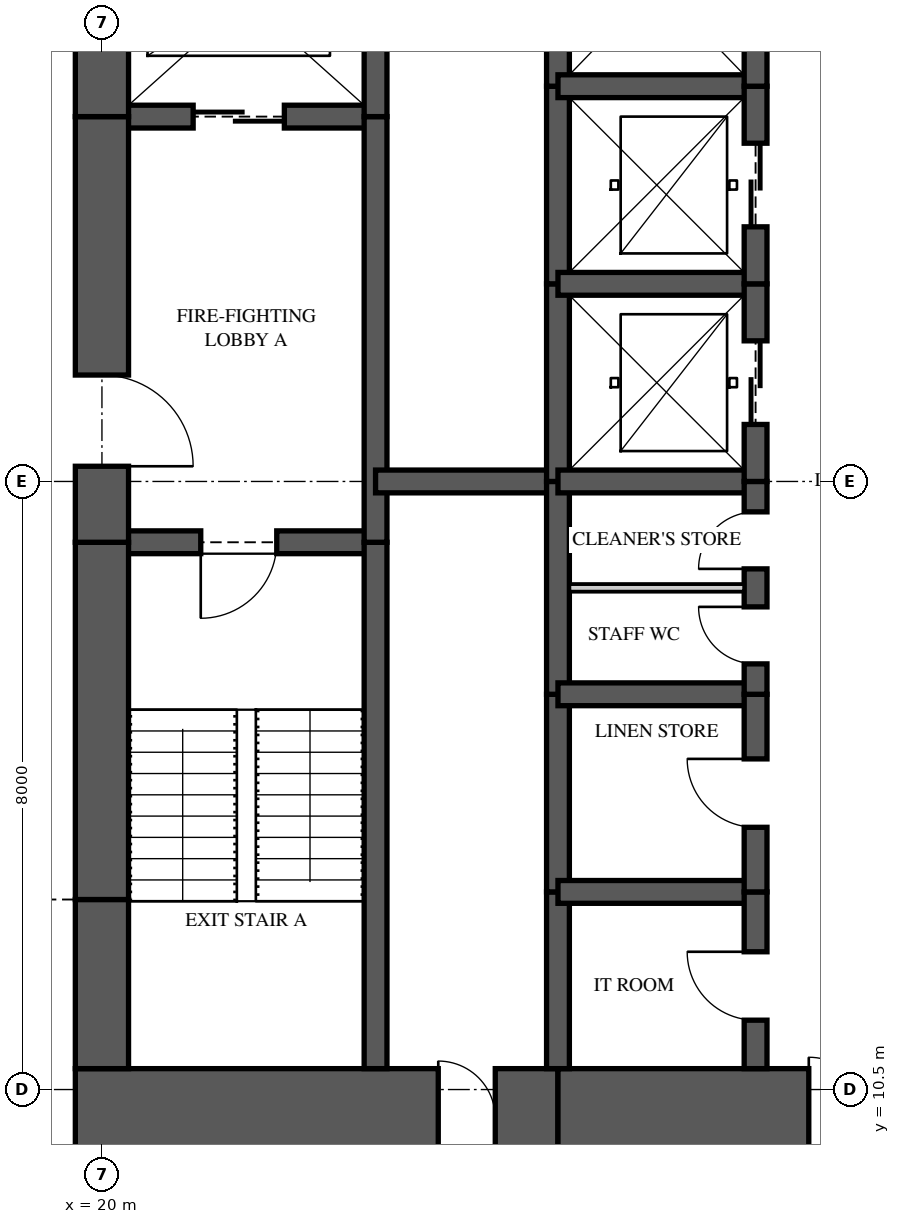
"""IFC4 building model, lengths in metres.
Left out: names, types, materials, properties, quantities, classifications, styles, units other than length and angle.
Written with IfcOpenShell. Run it as: python <this file> out.ifc"""

import sys

from ifc_helpers import new_model, si_unit, direction, frame, frame_2d, origin, place, context, subcontext, project, spatial, rectangle, extrude, element, fill, save


model = new_model("IFC4")
c1 = context("Model", 3, precision=1e-05, world=origin(), true_north=direction((0.0, 1.0)))
c2 = subcontext(c1, "Body", "Model", "MODEL_VIEW")
j1 = project(units=[si_unit("LENGTHUNIT", "METRE"), si_unit("PLANEANGLEUNIT", "RADIAN")], contexts=[c1])
p1 = place(None, origin())
s1 = spatial("IfcSite", under=j1, at=p1, CompositionType="ELEMENT")
p2 = place(p1, origin())
s2 = spatial("IfcBuilding", under=s1, at=p2, CompositionType="ELEMENT")
p3 = place(p2, frame((0.0, 0.0, 184.5)))
s3 = spatial("IfcBuildingStorey", under=s2, at=p3, CompositionType="ELEMENT", Elevation=184.5)
p4 = place(p3, frame((19.65, 10.125, 0.0), z_axis=(0.0, 0.0, 1.0), x_axis=(1.0, 0.0, 0.0)))
e1 = element("IfcWall", 1, at=p4, inside=s3, PredefinedType="SHEAR", context=c2, shape_type="SweptSolid", body=[
    extrude(rectangle(XDim=6.35, YDim=1.3, at=frame_2d((3.175, 0.0))), origin(), (0.0, 0.0, 1.0), 3.35),
])
p5 = place(p4, frame((4.775, 0.0, 0.0)))
e2 = element("IfcOpeningElement", 2, at=p5, cuts=e1, PredefinedType="OPENING", context=c2, shape_type="SweptSolid", body=[
    extrude(rectangle(XDim=0.75, YDim=2.1, at=frame_2d((0.375, 1.05))), frame((0.0, 0.66, 0.0), z_axis=(0.0, -1.0, 0.0), x_axis=(1.0, 0.0, 0.0)), (0.0, 0.0, 1.0), 1.32),
])
p6 = place(p3, frame((26.0, 10.125, 0.0), z_axis=(0.0, 0.0, 1.0), x_axis=(1.0, 0.0, 0.0)))
e3 = element("IfcWall", 3, at=p6, inside=s3, PredefinedType="SHEAR", context=c2, shape_type="SweptSolid", body=[
    extrude(rectangle(XDim=5.6, YDim=1.3, at=frame_2d((2.8, 0.0))), origin(), (0.0, 0.0, 1.0), 3.35),
])
p7 = place(p6, frame((3.3, 0.0, 0.0)))
e4 = element("IfcOpeningElement", 4, at=p7, cuts=e3, PredefinedType="OPENING", context=c2, shape_type="SweptSolid", body=[
    extrude(rectangle(XDim=1.6, YDim=2.1, at=frame_2d((0.8, 1.05))), frame((0.0, 0.66, 0.0), z_axis=(0.0, -1.0, 0.0), x_axis=(1.0, 0.0, 0.0)), (0.0, 0.0, 1.0), 1.32),
])
p8 = place(p3, frame((20.0, 26.225, 0.0), z_axis=(0.0, 0.0, 1.0), x_axis=(0.0, -1.0, 0.0)))
e5 = element("IfcWall", 5, at=p8, inside=s3, PredefinedType="SHEAR", context=c2, shape_type="SweptSolid", body=[
    extrude(rectangle(XDim=2.925, YDim=0.7, at=frame_2d((1.462, 0.0))), origin(), (0.0, 0.0, 1.0), 3.35),
])
p9 = place(p3, frame((20.0, 23.3, 0.0), z_axis=(0.0, 0.0, 1.0), x_axis=(0.0, -1.0, 0.0)))
e6 = element("IfcWall", 6, at=p9, inside=s3, PredefinedType="SHEAR", context=c2, shape_type="SweptSolid", body=[
    extrude(rectangle(XDim=5.6, YDim=0.7, at=frame_2d((2.8, 0.0))), origin(), (0.0, 0.0, 1.0), 3.35),
])
p10 = place(p9, frame((3.4, 0.0, 0.0)))
e7 = element("IfcOpeningElement", 7, at=p10, cuts=e6, PredefinedType="OPENING", context=c2, shape_type="SweptSolid", body=[
    extrude(rectangle(XDim=1.2, YDim=2.2, at=frame_2d((0.6, 1.1))), frame((0.0, 0.36, 0.0), z_axis=(0.0, -1.0, 0.0), x_axis=(1.0, 0.0, 0.0)), (0.0, 0.0, 1.0), 0.72),
])
p11 = place(p3, frame((20.0, 17.7, 0.0), z_axis=(0.0, 0.0, 1.0), x_axis=(0.0, -1.0, 0.0)))
e8 = element("IfcWall", 8, at=p11, inside=s3, PredefinedType="SHEAR", context=c2, shape_type="SweptSolid", body=[
    extrude(rectangle(XDim=4.7, YDim=0.7, at=frame_2d((2.35, 0.0))), origin(), (0.0, 0.0, 1.0), 3.35),
])
p12 = place(p3, frame((20.0, 13.0, 0.0), z_axis=(0.0, 0.0, 1.0), x_axis=(0.0, -1.0, 0.0)))
e9 = element("IfcWall", 9, at=p12, inside=s3, PredefinedType="SHEAR", context=c2, shape_type="SweptSolid", body=[
    extrude(rectangle(XDim=2.225, YDim=0.7, at=frame_2d((1.113, 0.0))), origin(), (0.0, 0.0, 1.0), 3.35),
])
p13 = place(p3, frame((23.6, 10.775, 0.0), z_axis=(0.0, 0.0, 1.0), x_axis=(0.0, 1.0, 0.0)))
e10 = element("IfcWall", 10, at=p13, inside=s3, PredefinedType="SHEAR", context=c2, shape_type="SweptSolid", body=[
    extrude(rectangle(XDim=6.925, YDim=0.3, at=frame_2d((3.462, 0.0))), origin(), (0.0, 0.0, 1.0), 3.35),
])
p14 = place(p3, frame((23.6, 17.7, 0.0), z_axis=(0.0, 0.0, 1.0), x_axis=(0.0, 1.0, 0.0)))
e11 = element("IfcWall", 11, at=p14, inside=s3, PredefinedType="SHEAR", context=c2, shape_type="SweptSolid", body=[
    extrude(rectangle(XDim=5.6, YDim=0.3, at=frame_2d((2.8, 0.0))), origin(), (0.0, 0.0, 1.0), 3.35),
])
p15 = place(p3, frame((23.6, 23.3, 0.0), z_axis=(0.0, 0.0, 1.0), x_axis=(0.0, 1.0, 0.0)))
e12 = element("IfcWall", 12, at=p15, inside=s3, PredefinedType="SHEAR", context=c2, shape_type="SweptSolid", body=[
    extrude(rectangle(XDim=2.925, YDim=0.3, at=frame_2d((1.462, 0.0))), origin(), (0.0, 0.0, 1.0), 3.35),
])
p16 = place(p3, frame((26.0, 10.775, 0.0), z_axis=(0.0, 0.0, 1.0), x_axis=(0.0, 1.0, 0.0)))
e13 = element("IfcWall", 13, at=p16, inside=s3, PredefinedType="SHEAR", context=c2, shape_type="SweptSolid", body=[
    extrude(rectangle(XDim=2.325, YDim=0.3, at=frame_2d((1.163, 0.0))), origin(), (0.0, 0.0, 1.0), 3.35),
])
p17 = place(p3, frame((26.0, 13.1, 0.0), z_axis=(0.0, 0.0, 1.0), x_axis=(0.0, 1.0, 0.0)))
e14 = element("IfcWall", 14, at=p17, inside=s3, PredefinedType="SHEAR", context=c2, shape_type="SweptSolid", body=[
    extrude(rectangle(XDim=2.6, YDim=0.3, at=frame_2d((1.3, 0.0))), origin(), (0.0, 0.0, 1.0), 3.35),
])
p18 = place(p3, frame((26.0, 15.7, 0.0), z_axis=(0.0, 0.0, 1.0), x_axis=(0.0, 1.0, 0.0)))
e15 = element("IfcWall", 15, at=p18, inside=s3, PredefinedType="SHEAR", context=c2, shape_type="SweptSolid", body=[
    extrude(rectangle(XDim=2.8, YDim=0.3, at=frame_2d((1.4, 0.0))), origin(), (0.0, 0.0, 1.0), 3.35),
])
p19 = place(p3, frame((26.0, 18.5, 0.0), z_axis=(0.0, 0.0, 1.0), x_axis=(0.0, 1.0, 0.0)))
e16 = element("IfcWall", 16, at=p19, inside=s3, PredefinedType="SHEAR", context=c2, shape_type="SweptSolid", body=[
    extrude(rectangle(XDim=2.6, YDim=0.3, at=frame_2d((1.3, 0.0))), origin(), (0.0, 0.0, 1.0), 3.35),
])
p20 = place(p3, frame((26.0, 21.1, 0.0), z_axis=(0.0, 0.0, 1.0), x_axis=(0.0, 1.0, 0.0)))
e17 = element("IfcWall", 17, at=p20, inside=s3, PredefinedType="SHEAR", context=c2, shape_type="SweptSolid", body=[
    extrude(rectangle(XDim=2.6, YDim=0.3, at=frame_2d((1.3, 0.0))), origin(), (0.0, 0.0, 1.0), 3.35),
])
p21 = place(p3, frame((26.0, 23.7, 0.0), z_axis=(0.0, 0.0, 1.0), x_axis=(0.0, 1.0, 0.0)))
e18 = element("IfcWall", 18, at=p21, inside=s3, PredefinedType="SHEAR", context=c2, shape_type="SweptSolid", body=[
    extrude(rectangle(XDim=2.525, YDim=0.3, at=frame_2d((1.263, 0.0))), origin(), (0.0, 0.0, 1.0), 3.35),
])
p22 = place(p3, frame((28.6, 10.775, 0.0), z_axis=(0.0, 0.0, 1.0), x_axis=(0.0, 1.0, 0.0)))
e19 = element("IfcWall", 19, at=p22, inside=s3, PredefinedType="SHEAR", context=c2, shape_type="SweptSolid", body=[
    extrude(rectangle(XDim=2.325, YDim=0.3, at=frame_2d((1.163, 0.0))), origin(), (0.0, 0.0, 1.0), 3.35),
])
p23 = place(p22, frame((0.637, 0.0, 0.0)))
e20 = element("IfcOpeningElement", 20, at=p23, cuts=e19, PredefinedType="OPENING", context=c2, shape_type="SweptSolid", body=[
    extrude(rectangle(XDim=0.9, YDim=2.1, at=frame_2d((0.45, 1.05))), frame((0.0, 0.16, 0.0), z_axis=(0.0, -1.0, 0.0), x_axis=(1.0, 0.0, 0.0)), (0.0, 0.0, 1.0), 0.32),
])
p24 = place(p3, frame((28.6, 13.1, 0.0), z_axis=(0.0, 0.0, 1.0), x_axis=(0.0, 1.0, 0.0)))
e21 = element("IfcWall", 21, at=p24, inside=s3, PredefinedType="SHEAR", context=c2, shape_type="SweptSolid", body=[
    extrude(rectangle(XDim=2.6, YDim=0.3, at=frame_2d((1.3, 0.0))), origin(), (0.0, 0.0, 1.0), 3.35),
])
p25 = place(p24, frame((0.85, 0.0, 0.0)))
e22 = element("IfcOpeningElement", 22, at=p25, cuts=e21, PredefinedType="OPENING", context=c2, shape_type="SweptSolid", body=[
    extrude(rectangle(XDim=0.9, YDim=2.1, at=frame_2d((0.45, 1.05))), frame((0.0, 0.16, 0.0), z_axis=(0.0, -1.0, 0.0), x_axis=(1.0, 0.0, 0.0)), (0.0, 0.0, 1.0), 0.32),
])
p26 = place(p3, frame((28.6, 15.7, 0.0), z_axis=(0.0, 0.0, 1.0), x_axis=(0.0, 1.0, 0.0)))
e23 = element("IfcWall", 23, at=p26, inside=s3, PredefinedType="SHEAR", context=c2, shape_type="SweptSolid", body=[
    extrude(rectangle(XDim=2.8, YDim=0.3, at=frame_2d((1.4, 0.0))), origin(), (0.0, 0.0, 1.0), 3.35),
])
p27 = place(p26, frame((0.4, 0.0, 0.0)))
e24 = element("IfcOpeningElement", 24, at=p27, cuts=e23, PredefinedType="OPENING", context=c2, shape_type="SweptSolid", body=[
    extrude(rectangle(XDim=0.75, YDim=2.1, at=frame_2d((0.375, 1.05))), frame((0.0, 0.16, 0.0), z_axis=(0.0, -1.0, 0.0), x_axis=(1.0, 0.0, 0.0)), (0.0, 0.0, 1.0), 0.32),
])
p28 = place(p26, frame((1.65, 0.0, 0.0)))
e25 = element("IfcOpeningElement", 25, at=p28, cuts=e23, PredefinedType="OPENING", context=c2, shape_type="SweptSolid", body=[
    extrude(rectangle(XDim=0.75, YDim=2.1, at=frame_2d((0.375, 1.05))), frame((0.0, 0.16, 0.0), z_axis=(0.0, -1.0, 0.0), x_axis=(1.0, 0.0, 0.0)), (0.0, 0.0, 1.0), 0.32),
])
p29 = place(p3, frame((28.6, 18.5, 0.0), z_axis=(0.0, 0.0, 1.0), x_axis=(0.0, 1.0, 0.0)))
e26 = element("IfcWall", 26, at=p29, inside=s3, PredefinedType="SHEAR", context=c2, shape_type="SweptSolid", body=[
    extrude(rectangle(XDim=2.6, YDim=0.3, at=frame_2d((1.3, 0.0))), origin(), (0.0, 0.0, 1.0), 3.35),
])
p30 = place(p29, frame((0.75, 0.0, 0.0)))
e27 = element("IfcOpeningElement", 27, at=p30, cuts=e26, PredefinedType="OPENING", context=c2, shape_type="SweptSolid", body=[
    extrude(rectangle(XDim=1.1, YDim=2.1, at=frame_2d((0.55, 1.05))), frame((0.0, 0.16, 0.0), z_axis=(0.0, -1.0, 0.0), x_axis=(1.0, 0.0, 0.0)), (0.0, 0.0, 1.0), 0.32),
])
p31 = place(p3, frame((28.6, 21.1, 0.0), z_axis=(0.0, 0.0, 1.0), x_axis=(0.0, 1.0, 0.0)))
e28 = element("IfcWall", 28, at=p31, inside=s3, PredefinedType="SHEAR", context=c2, shape_type="SweptSolid", body=[
    extrude(rectangle(XDim=2.6, YDim=0.3, at=frame_2d((1.3, 0.0))), origin(), (0.0, 0.0, 1.0), 3.35),
])
p32 = place(p31, frame((0.75, 0.0, 0.0)))
e29 = element("IfcOpeningElement", 29, at=p32, cuts=e28, PredefinedType="OPENING", context=c2, shape_type="SweptSolid", body=[
    extrude(rectangle(XDim=1.1, YDim=2.1, at=frame_2d((0.55, 1.05))), frame((0.0, 0.16, 0.0), z_axis=(0.0, -1.0, 0.0), x_axis=(1.0, 0.0, 0.0)), (0.0, 0.0, 1.0), 0.32),
])
p33 = place(p3, frame((28.6, 23.7, 0.0), z_axis=(0.0, 0.0, 1.0), x_axis=(0.0, 1.0, 0.0)))
e30 = element("IfcWall", 30, at=p33, inside=s3, PredefinedType="SHEAR", context=c2, shape_type="SweptSolid", body=[
    extrude(rectangle(XDim=2.525, YDim=0.3, at=frame_2d((1.263, 0.0))), origin(), (0.0, 0.0, 1.0), 3.35),
])
p34 = place(p33, frame((0.85, 0.0, 0.0)))
e31 = element("IfcOpeningElement", 31, at=p34, cuts=e30, PredefinedType="OPENING", context=c2, shape_type="SweptSolid", body=[
    extrude(rectangle(XDim=1.1, YDim=2.1, at=frame_2d((0.55, 1.05))), frame((0.0, 0.16, 0.0), z_axis=(0.0, -1.0, 0.0), x_axis=(1.0, 0.0, 0.0)), (0.0, 0.0, 1.0), 0.32),
])
p35 = place(p3, frame((20.0, 17.7, 0.0), z_axis=(0.0, 0.0, 1.0), x_axis=(1.0, 0.0, 0.0)))
e32 = element("IfcWall", 32, at=p35, inside=s3, PredefinedType="SHEAR", context=c2, shape_type="SweptSolid", body=[
    extrude(rectangle(XDim=3.6, YDim=0.3, at=frame_2d((1.8, 0.0))), origin(), (0.0, 0.0, 1.0), 3.35),
])
p36 = place(p35, frame((1.3, 0.0, 0.0)))
e33 = element("IfcOpeningElement", 33, at=p36, cuts=e32, PredefinedType="OPENING", context=c2, shape_type="SweptSolid", body=[
    extrude(rectangle(XDim=1.0, YDim=2.1, at=frame_2d((0.5, 1.05))), frame((0.0, 0.16, 0.0), z_axis=(0.0, -1.0, 0.0), x_axis=(1.0, 0.0, 0.0)), (0.0, 0.0, 1.0), 0.32),
])
p37 = place(p3, frame((20.0, 23.3, 0.0), z_axis=(0.0, 0.0, 1.0), x_axis=(1.0, 0.0, 0.0)))
e34 = element("IfcWall", 34, at=p37, inside=s3, PredefinedType="SHEAR", context=c2, shape_type="SweptSolid", body=[
    extrude(rectangle(XDim=3.6, YDim=0.3, at=frame_2d((1.8, 0.0))), origin(), (0.0, 0.0, 1.0), 3.35),
])
p38 = place(p37, frame((1.2, 0.0, 0.0)))
e35 = element("IfcOpeningElement", 35, at=p38, cuts=e34, PredefinedType="OPENING", context=c2, shape_type="SweptSolid", body=[
    extrude(rectangle(XDim=1.2, YDim=2.1, at=frame_2d((0.6, 1.05))), frame((0.0, 0.16, 0.0), z_axis=(0.0, -1.0, 0.0), x_axis=(1.0, 0.0, 0.0)), (0.0, 0.0, 1.0), 0.32),
])
p39 = place(p3, frame((23.6, 18.5, 0.0), z_axis=(0.0, 0.0, 1.0), x_axis=(1.0, 0.0, 0.0)))
e36 = element("IfcWall", 36, at=p39, inside=s3, PredefinedType="SHEAR", context=c2, shape_type="SweptSolid", body=[
    extrude(rectangle(XDim=2.4, YDim=0.3, at=frame_2d((1.2, 0.0))), origin(), (0.0, 0.0, 1.0), 3.35),
])
for number, where, z_axis, x_axis in (
    (37, (26.0, 13.1, 0.0), (0.0, 0.0, 1.0), (1.0, 0.0, 0.0)),
    (38, (26.0, 15.7, 0.0), (0.0, 0.0, 1.0), (1.0, 0.0, 0.0)),
    (39, (26.0, 18.5, 0.0), (0.0, 0.0, 1.0), (1.0, 0.0, 0.0)),
    (40, (26.0, 21.1, 0.0), (0.0, 0.0, 1.0), (1.0, 0.0, 0.0)),
    (41, (26.0, 23.7, 0.0), (0.0, 0.0, 1.0), (1.0, 0.0, 0.0)),
):
    element("IfcWall", number, at=place(p3, frame(where, z_axis=z_axis, x_axis=x_axis)), inside=s3, PredefinedType="SHEAR", context=c2, shape_type="SweptSolid", body=[
        extrude(rectangle(XDim=2.6, YDim=0.3, at=frame_2d((1.3, 0.0))), origin(), (0.0, 0.0, 1.0), 3.35),
    ])
p40 = place(p3, frame((26.15, 17.1, 0.0), z_axis=(0.0, 0.0, 1.0), x_axis=(1.0, 0.0, 0.0)))
e42 = element("IfcWall", 42, at=p40, inside=s3, PredefinedType="PARTITIONING", context=c2, shape_type="SweptSolid", body=[
    extrude(rectangle(XDim=2.3, YDim=0.1, at=frame_2d((1.15, 0.0))), origin(), (0.0, 0.0, 1.0), 3.11),
])
p41 = place(p36, frame((1.0, 0.0, 0.0), z_axis=(0.0, 0.0, 1.0), x_axis=(-1.0, 0.0, 0.0)))
e43 = element("IfcDoor", 43, at=p41, inside=s3, OperationType="SINGLE_SWING_RIGHT", PredefinedType="DOOR", context=c2, shape_type="SweptSolid", body=[
    extrude(rectangle(XDim=1.0, YDim=2.1, at=frame_2d((0.5, 1.05))), frame((0.0, 0.025, 0.0), z_axis=(0.0, -1.0, 0.0), x_axis=(1.0, 0.0, 0.0)), (0.0, 0.0, 1.0), 0.05),
])
fill(e33, e43)
p42 = place(p10, origin())
e44 = element("IfcDoor", 44, at=p42, inside=s3, OperationType="SINGLE_SWING_RIGHT", PredefinedType="DOOR", context=c2, shape_type="SweptSolid", body=[
    extrude(rectangle(XDim=1.2, YDim=2.2, at=frame_2d((0.6, 1.1))), frame((0.0, 0.025, 0.0), z_axis=(0.0, -1.0, 0.0), x_axis=(1.0, 0.0, 0.0)), (0.0, 0.0, 1.0), 0.05),
])
fill(e7, e44)
p43 = place(p38, origin())
e45 = element("IfcDoor", 45, at=p43, inside=s3, OperationType="SLIDING_TO_LEFT", PredefinedType="DOOR", context=c2, shape_type="SweptSolid", body=[
    extrude(rectangle(XDim=1.2, YDim=2.1, at=frame_2d((0.6, 1.05))), frame((0.0, 0.025, 0.0), z_axis=(0.0, -1.0, 0.0), x_axis=(1.0, 0.0, 0.0)), (0.0, 0.0, 1.0), 0.05),
])
fill(e35, e45)
p44 = place(p30, origin())
e46 = element("IfcDoor", 46, at=p44, inside=s3, OperationType="SLIDING_TO_LEFT", PredefinedType="DOOR", context=c2, shape_type="SweptSolid", body=[
    extrude(rectangle(XDim=1.1, YDim=2.1, at=frame_2d((0.55, 1.05))), frame((0.0, 0.025, 0.0), z_axis=(0.0, -1.0, 0.0), x_axis=(1.0, 0.0, 0.0)), (0.0, 0.0, 1.0), 0.05),
])
fill(e27, e46)
p45 = place(p32, origin())
e47 = element("IfcDoor", 47, at=p45, inside=s3, OperationType="SLIDING_TO_LEFT", PredefinedType="DOOR", context=c2, shape_type="SweptSolid", body=[
    extrude(rectangle(XDim=1.1, YDim=2.1, at=frame_2d((0.55, 1.05))), frame((0.0, 0.025, 0.0), z_axis=(0.0, -1.0, 0.0), x_axis=(1.0, 0.0, 0.0)), (0.0, 0.0, 1.0), 0.05),
])
fill(e29, e47)
p46 = place(p23, origin())
e48 = element("IfcDoor", 48, at=p46, inside=s3, OperationType="SINGLE_SWING_RIGHT", PredefinedType="DOOR", context=c2, shape_type="SweptSolid", body=[
    extrude(rectangle(XDim=0.9, YDim=2.1, at=frame_2d((0.45, 1.05))), frame((0.0, 0.025, 0.0), z_axis=(0.0, -1.0, 0.0), x_axis=(1.0, 0.0, 0.0)), (0.0, 0.0, 1.0), 0.05),
])
fill(e20, e48)
p47 = place(p25, origin())
e49 = element("IfcDoor", 49, at=p47, inside=s3, OperationType="SINGLE_SWING_RIGHT", PredefinedType="DOOR", context=c2, shape_type="SweptSolid", body=[
    extrude(rectangle(XDim=0.9, YDim=2.1, at=frame_2d((0.45, 1.05))), frame((0.0, 0.025, 0.0), z_axis=(0.0, -1.0, 0.0), x_axis=(1.0, 0.0, 0.0)), (0.0, 0.0, 1.0), 0.05),
])
fill(e22, e49)
p48 = place(p27, origin())
e50 = element("IfcDoor", 50, at=p48, inside=s3, OperationType="SINGLE_SWING_RIGHT", PredefinedType="DOOR", context=c2, shape_type="SweptSolid", body=[
    extrude(rectangle(XDim=0.75, YDim=2.1, at=frame_2d((0.375, 1.05))), frame((0.0, 0.025, 0.0), z_axis=(0.0, -1.0, 0.0), x_axis=(1.0, 0.0, 0.0)), (0.0, 0.0, 1.0), 0.05),
])
fill(e24, e50)
p49 = place(p28, origin())
e51 = element("IfcDoor", 51, at=p49, inside=s3, OperationType="SINGLE_SWING_LEFT", PredefinedType="DOOR", context=c2, shape_type="SweptSolid", body=[
    extrude(rectangle(XDim=0.75, YDim=2.1, at=frame_2d((0.375, 1.05))), frame((0.0, 0.025, 0.0), z_axis=(0.0, -1.0, 0.0), x_axis=(1.0, 0.0, 0.0)), (0.0, 0.0, 1.0), 0.05),
])
fill(e25, e51)
p50 = place(p7, origin())
e52 = element("IfcDoor", 52, at=p50, inside=s3, OperationType="DOUBLE_DOOR_SINGLE_SWING", PredefinedType="DOOR", context=c2, shape_type="SweptSolid", body=[
    extrude(rectangle(XDim=1.6, YDim=2.1, at=frame_2d((0.8, 1.05))), frame((0.0, 0.025, 0.0), z_axis=(0.0, -1.0, 0.0), x_axis=(1.0, 0.0, 0.0)), (0.0, 0.0, 1.0), 0.05),
])
fill(e4, e52)
p51 = place(p5, origin())
e53 = element("IfcDoor", 53, at=p51, inside=s3, OperationType="SINGLE_SWING_LEFT", PredefinedType="DOOR", context=c2, shape_type="SweptSolid", body=[
    extrude(rectangle(XDim=0.75, YDim=2.1, at=frame_2d((0.375, 1.05))), frame((0.0, 0.025, 0.0), z_axis=(0.0, -1.0, 0.0), x_axis=(1.0, 0.0, 0.0)), (0.0, 0.0, 1.0), 0.05),
])
fill(e2, e53)
save(model, sys.argv[1])
